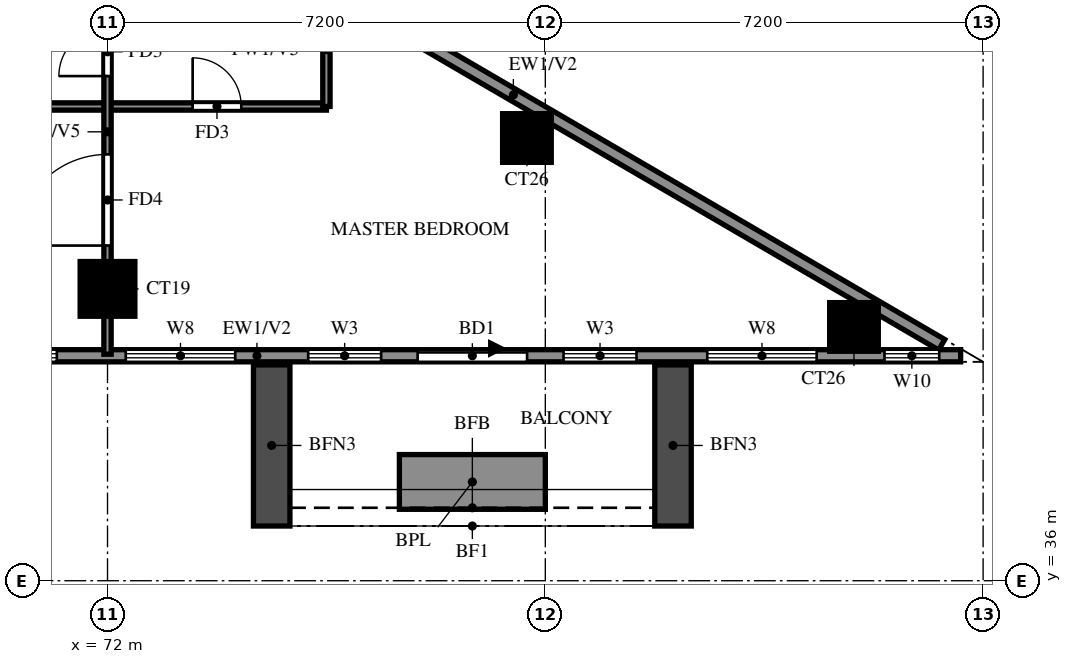
"""IFC4 building model, lengths in metres.
Left out: names, types, materials, properties, quantities, classifications, styles, units other than length and angle.
Written with IfcOpenShell. Run it as: python <this file> out.ifc"""

import sys

from ifc_helpers import new_model, si_unit, direction, frame, frame_2d, origin, origin_2d, place, context, subcontext, project, spatial, rectangle, extrude, source, transform, mapped, element, fill, save


model = new_model("IFC4")
c1 = context("Model", 3, precision=1e-05, world=origin(), true_north=direction((0.0, 1.0)))
c2 = subcontext(c1, "Body", "Model", "MODEL_VIEW")
j1 = project(units=[si_unit("LENGTHUNIT", "METRE"), si_unit("PLANEANGLEUNIT", "RADIAN")], contexts=[c1])
p1 = place(None, origin())
s1 = spatial("IfcSite", under=j1, at=p1, CompositionType="ELEMENT")
p2 = place(p1, origin())
s2 = spatial("IfcBuilding", under=s1, at=p2, CompositionType="ELEMENT")
p3 = place(p2, frame((0.0, 0.0, 195.5)))
s3 = spatial("IfcBuildingStorey", under=s2, at=p3, CompositionType="ELEMENT", Elevation=195.5)
m1 = source(origin(), c2, "Body", "SweptSolid", [
    extrude(rectangle(XDim=0.8, YDim=0.8, at=origin_2d()), origin(), (0.0, 0.0, 1.0), 3.2),
])
p4 = place(p3, frame((84.276, 40.174, 0.0), z_axis=(0.0, 0.0, 1.0), x_axis=(1.0, 0.0, 0.0)))
e1 = element("IfcColumn", 1, at=p4, inside=s3, PredefinedType="COLUMN", context=c2, shape_type="MappedRepresentation", body=[
    mapped(m1, transform((0.0, 0.0, 0.0))),
])
m2 = source(origin(), c2, "Body", "SweptSolid", [
    extrude(rectangle(XDim=0.9, YDim=0.9, at=origin_2d()), origin(), (0.0, 0.0, 1.0), 3.2),
])
p5 = place(p3, frame((72.0, 40.8, 0.0), z_axis=(0.0, 0.0, 1.0), x_axis=(1.0, 0.0, 0.0)))
e2 = element("IfcColumn", 2, at=p5, inside=s3, PredefinedType="COLUMN", context=c2, shape_type="MappedRepresentation", body=[
    mapped(m2, transform((0.0, 0.0, 0.0))),
])
p6 = place(p3, frame((78.898, 43.282, 0.0), z_axis=(0.0, 0.0, 1.0), x_axis=(1.0, 0.0, 0.0)))
e3 = element("IfcColumn", 3, at=p6, inside=s3, PredefinedType="COLUMN", context=c2, shape_type="MappedRepresentation", body=[
    mapped(m1, transform((0.0, 0.0, 0.0))),
])
p7 = place(p3, frame((85.719, 39.881, 0.0), z_axis=(0.0, 0.0, 1.0), x_axis=(-0.86377618652, 0.503875678716, 0.0)))
e4 = element("IfcWall", 4, at=p7, inside=s3, PredefinedType="SOLIDWALL", context=c2, shape_type="SweptSolid", body=[
    extrude(rectangle(XDim=16.311, YDim=0.2, at=frame_2d((8.156, 0.0))), origin(), (0.0, 0.0, 1.0), 3.2),
])
p8 = place(p7, frame((13.326, 0.0, 1.5)))
e5 = element("IfcOpeningElement", 5, at=p8, cuts=e4, PredefinedType="OPENING", context=c2, shape_type="SweptSolid", body=[
    extrude(rectangle(XDim=0.9, YDim=0.9, at=frame_2d((0.45, 0.45))), frame((0.0, 0.11, 0.0), z_axis=(0.0, -1.0, 0.0), x_axis=(1.0, 0.0, 0.0)), (0.0, 0.0, 1.0), 0.22),
])
p9 = place(p3, frame((58.8, 39.7, 0.0), z_axis=(0.0, 0.0, 1.0), x_axis=(1.0, 0.0, 0.0)))
e6 = element("IfcWall", 6, at=p9, inside=s3, PredefinedType="SOLIDWALL", context=c2, shape_type="SweptSolid", body=[
    extrude(rectangle(XDim=27.23, YDim=0.2, at=frame_2d((13.615, 0.0))), origin(), (0.0, 0.0, 1.0), 3.2),
])
p10 = place(p9, frame((18.3, 0.0, 0.0)))
e7 = element("IfcOpeningElement", 7, at=p10, cuts=e6, PredefinedType="OPENING", context=c2, shape_type="SweptSolid", body=[
    extrude(rectangle(XDim=1.8, YDim=2.4, at=frame_2d((0.9, 1.2))), frame((0.0, 0.11, 0.0), z_axis=(0.0, -1.0, 0.0), x_axis=(1.0, 0.0, 0.0)), (0.0, 0.0, 1.0), 0.22),
])
p11 = place(p9, frame((6.833, 0.0, 0.6)))
e8 = element("IfcOpeningElement", 8, at=p11, cuts=e6, PredefinedType="OPENING", context=c2, shape_type="SweptSolid", body=[
    extrude(rectangle(XDim=2.4, YDim=2.4, at=frame_2d((1.2, 1.2))), frame((0.0, 0.11, 0.0), z_axis=(0.0, -1.0, 0.0), x_axis=(1.0, 0.0, 0.0)), (0.0, 0.0, 1.0), 0.22),
])
p12 = place(p9, frame((9.967, 0.0, 0.6)))
e9 = element("IfcOpeningElement", 9, at=p12, cuts=e6, PredefinedType="OPENING", context=c2, shape_type="SweptSolid", body=[
    extrude(rectangle(XDim=2.4, YDim=2.4, at=frame_2d((1.2, 1.2))), frame((0.0, 0.11, 0.0), z_axis=(0.0, -1.0, 0.0), x_axis=(1.0, 0.0, 0.0)), (0.0, 0.0, 1.0), 0.22),
])
p13 = place(p9, frame((13.5, 0.0, 0.6)))
e10 = element("IfcOpeningElement", 10, at=p13, cuts=e6, PredefinedType="OPENING", context=c2, shape_type="SweptSolid", body=[
    extrude(rectangle(XDim=1.8, YDim=2.4, at=frame_2d((0.9, 1.2))), frame((0.0, 0.11, 0.0), z_axis=(0.0, -1.0, 0.0), x_axis=(1.0, 0.0, 0.0)), (0.0, 0.0, 1.0), 0.22),
])
p14 = place(p9, frame((16.5, 0.0, 0.6)))
e11 = element("IfcOpeningElement", 11, at=p14, cuts=e6, PredefinedType="OPENING", context=c2, shape_type="SweptSolid", body=[
    extrude(rectangle(XDim=1.2, YDim=2.4, at=frame_2d((0.6, 1.2))), frame((0.0, 0.11, 0.0), z_axis=(0.0, -1.0, 0.0), x_axis=(1.0, 0.0, 0.0)), (0.0, 0.0, 1.0), 0.22),
])
p15 = place(p9, frame((20.7, 0.0, 0.6)))
e12 = element("IfcOpeningElement", 12, at=p15, cuts=e6, PredefinedType="OPENING", context=c2, shape_type="SweptSolid", body=[
    extrude(rectangle(XDim=1.2, YDim=2.4, at=frame_2d((0.6, 1.2))), frame((0.0, 0.11, 0.0), z_axis=(0.0, -1.0, 0.0), x_axis=(1.0, 0.0, 0.0)), (0.0, 0.0, 1.0), 0.22),
])
p16 = place(p9, frame((23.063, 0.0, 0.6)))
e13 = element("IfcOpeningElement", 13, at=p16, cuts=e6, PredefinedType="OPENING", context=c2, shape_type="SweptSolid", body=[
    extrude(rectangle(XDim=1.8, YDim=2.4, at=frame_2d((0.9, 1.2))), frame((0.0, 0.11, 0.0), z_axis=(0.0, -1.0, 0.0), x_axis=(1.0, 0.0, 0.0)), (0.0, 0.0, 1.0), 0.22),
])
p17 = place(p9, frame((25.978, 0.0, 0.6)))
e14 = element("IfcOpeningElement", 14, at=p17, cuts=e6, PredefinedType="OPENING", context=c2, shape_type="SweptSolid", body=[
    extrude(rectangle(XDim=0.9, YDim=2.4, at=frame_2d((0.45, 1.2))), frame((0.0, 0.11, 0.0), z_axis=(0.0, -1.0, 0.0), x_axis=(1.0, 0.0, 0.0)), (0.0, 0.0, 1.0), 0.22),
])
for number, where, z_axis, x_axis in (
    (15, (74.7, 39.55, 0.0), (0.0, 0.0, 1.0), (0.0, -1.0, 0.0)),
    (16, (81.3, 39.55, 0.0), (0.0, 0.0, 1.0), (0.0, -1.0, 0.0)),
):
    element("IfcWall", number, at=place(p3, frame(where, z_axis=z_axis, x_axis=x_axis)), inside=s3, PredefinedType="SOLIDWALL", context=c2, shape_type="SweptSolid", body=[
        extrude(rectangle(XDim=2.65, YDim=0.6, at=frame_2d((1.325, 0.0))), origin(), (0.0, 0.0, 1.0), 2.85),
    ])
p18 = place(p3, frame((76.8, 37.625, 0.0), z_axis=(0.0, 0.0, 1.0), x_axis=(1.0, 0.0, 0.0)))
e17 = element("IfcWall", 17, at=p18, inside=s3, PredefinedType="SOLIDWALL", context=c2, shape_type="SweptSolid", body=[
    extrude(rectangle(XDim=2.4, YDim=0.9, at=frame_2d((1.2, 0.0))), origin(), (0.0, 0.0, 1.0), 0.9),
])
p19 = place(p3, frame((60.0, 43.8, 0.0), z_axis=(0.0, 0.0, 1.0), x_axis=(1.0, 0.0, 0.0)))
e18 = element("IfcWall", 18, at=p19, inside=s3, PredefinedType="PARTITIONING", context=c2, shape_type="SweptSolid", body=[
    extrude(rectangle(XDim=15.6, YDim=0.12, at=frame_2d((7.8, 0.0))), origin(), (0.0, 0.0, 1.0), 3.2),
])
p20 = place(p19, frame((7.65, 0.0, 0.0)))
e19 = element("IfcOpeningElement", 19, at=p20, cuts=e18, PredefinedType="OPENING", context=c2, shape_type="SweptSolid", body=[
    extrude(rectangle(XDim=1.5, YDim=2.1, at=frame_2d((0.75, 1.05))), frame((0.0, 0.07, 0.0), z_axis=(0.0, -1.0, 0.0), x_axis=(1.0, 0.0, 0.0)), (0.0, 0.0, 1.0), 0.14),
])
p21 = place(p19, frame((1.95, 0.0, 0.0)))
e20 = element("IfcOpeningElement", 20, at=p21, cuts=e18, PredefinedType="OPENING", context=c2, shape_type="SweptSolid", body=[
    extrude(rectangle(XDim=0.9, YDim=2.1, at=frame_2d((0.45, 1.05))), frame((0.0, 0.07, 0.0), z_axis=(0.0, -1.0, 0.0), x_axis=(1.0, 0.0, 0.0)), (0.0, 0.0, 1.0), 0.14),
])
p22 = place(p19, frame((13.4, 0.0, 0.0)))
e21 = element("IfcOpeningElement", 21, at=p22, cuts=e18, PredefinedType="OPENING", context=c2, shape_type="SweptSolid", body=[
    extrude(rectangle(XDim=0.8, YDim=2.1, at=frame_2d((0.4, 1.05))), frame((0.0, 0.07, 0.0), z_axis=(0.0, -1.0, 0.0), x_axis=(1.0, 0.0, 0.0)), (0.0, 0.0, 1.0), 0.14),
])
p23 = place(p3, frame((72.0, 39.725, 0.0), z_axis=(0.0, 0.0, 1.0), x_axis=(0.0, 1.0, 0.0)))
e22 = element("IfcWall", 22, at=p23, inside=s3, PredefinedType="PARTITIONING", context=c2, shape_type="SweptSolid", body=[
    extrude(rectangle(XDim=8.13, YDim=0.12, at=frame_2d((4.065, 0.0))), origin(), (0.0, 0.0, 1.0), 2.3),
])
p24 = place(p23, frame((1.788, 0.0, 0.0)))
e23 = element("IfcOpeningElement", 23, at=p24, cuts=e22, PredefinedType="OPENING", context=c2, shape_type="SweptSolid", body=[
    extrude(rectangle(XDim=1.5, YDim=2.1, at=frame_2d((0.75, 1.05))), frame((0.0, 0.07, 0.0), z_axis=(0.0, -1.0, 0.0), x_axis=(1.0, 0.0, 0.0)), (0.0, 0.0, 1.0), 0.14),
])
p25 = place(p23, frame((4.575, 0.0, 0.0)))
e24 = element("IfcOpeningElement", 24, at=p25, cuts=e22, PredefinedType="OPENING", context=c2, shape_type="SweptSolid", body=[
    extrude(rectangle(XDim=0.8, YDim=2.1, at=frame_2d((0.4, 1.05))), frame((0.0, 0.07, 0.0), z_axis=(0.0, -1.0, 0.0), x_axis=(1.0, 0.0, 0.0)), (0.0, 0.0, 1.0), 0.14),
])
p26 = place(p3, frame((75.6, 43.8, 0.0), z_axis=(0.0, 0.0, 1.0), x_axis=(0.0, 1.0, 0.0)))
e25 = element("IfcWall", 25, at=p26, inside=s3, PredefinedType="PARTITIONING", context=c2, shape_type="SweptSolid", body=[
    extrude(rectangle(XDim=1.868, YDim=0.12, at=frame_2d((0.934, 0.0))), origin(), (0.0, 0.0, 1.0), 2.3),
])
p27 = place(p10, origin())
e26 = element("IfcDoor", 26, at=p27, inside=s3, OperationType="DOUBLE_DOOR_SLIDING", PredefinedType="DOOR", context=c2, shape_type="SweptSolid", body=[
    extrude(rectangle(XDim=1.8, YDim=2.4, at=frame_2d((0.9, 1.2))), frame((0.0, 0.025, 0.0), z_axis=(0.0, -1.0, 0.0), x_axis=(1.0, 0.0, 0.0)), (0.0, 0.0, 1.0), 0.05),
])
fill(e7, e26)
p28 = place(p12, origin())
e27 = element("IfcWindow", 27, at=p28, inside=s3, PartitioningType="DOUBLE_PANEL_VERTICAL", PredefinedType="WINDOW", context=c2, shape_type="SweptSolid", body=[
    extrude(rectangle(XDim=2.4, YDim=2.4, at=frame_2d((1.2, 1.2))), frame((0.0, 0.03, 0.0), z_axis=(0.0, -1.0, 0.0), x_axis=(1.0, 0.0, 0.0)), (0.0, 0.0, 1.0), 0.06),
])
fill(e9, e27)
p29 = place(p13, origin())
e28 = element("IfcWindow", 28, at=p29, inside=s3, PartitioningType="DOUBLE_PANEL_VERTICAL", PredefinedType="WINDOW", context=c2, shape_type="SweptSolid", body=[
    extrude(rectangle(XDim=1.8, YDim=2.4, at=frame_2d((0.9, 1.2))), frame((0.0, 0.03, 0.0), z_axis=(0.0, -1.0, 0.0), x_axis=(1.0, 0.0, 0.0)), (0.0, 0.0, 1.0), 0.06),
])
fill(e10, e28)
p30 = place(p14, origin())
e29 = element("IfcWindow", 29, at=p30, inside=s3, PartitioningType="SINGLE_PANEL", PredefinedType="WINDOW", context=c2, shape_type="SweptSolid", body=[
    extrude(rectangle(XDim=1.2, YDim=2.4, at=frame_2d((0.6, 1.2))), frame((0.0, 0.03, 0.0), z_axis=(0.0, -1.0, 0.0), x_axis=(1.0, 0.0, 0.0)), (0.0, 0.0, 1.0), 0.06),
])
fill(e11, e29)
p31 = place(p15, origin())
e30 = element("IfcWindow", 30, at=p31, inside=s3, PartitioningType="SINGLE_PANEL", PredefinedType="WINDOW", context=c2, shape_type="SweptSolid", body=[
    extrude(rectangle(XDim=1.2, YDim=2.4, at=frame_2d((0.6, 1.2))), frame((0.0, 0.03, 0.0), z_axis=(0.0, -1.0, 0.0), x_axis=(1.0, 0.0, 0.0)), (0.0, 0.0, 1.0), 0.06),
])
fill(e12, e30)
p32 = place(p16, origin())
e31 = element("IfcWindow", 31, at=p32, inside=s3, PartitioningType="DOUBLE_PANEL_VERTICAL", PredefinedType="WINDOW", context=c2, shape_type="SweptSolid", body=[
    extrude(rectangle(XDim=1.8, YDim=2.4, at=frame_2d((0.9, 1.2))), frame((0.0, 0.03, 0.0), z_axis=(0.0, -1.0, 0.0), x_axis=(1.0, 0.0, 0.0)), (0.0, 0.0, 1.0), 0.06),
])
fill(e13, e31)
p33 = place(p17, origin())
e32 = element("IfcWindow", 32, at=p33, inside=s3, PartitioningType="SINGLE_PANEL", PredefinedType="WINDOW", context=c2, shape_type="SweptSolid", body=[
    extrude(rectangle(XDim=0.9, YDim=2.4, at=frame_2d((0.45, 1.2))), frame((0.0, 0.03, 0.0), z_axis=(0.0, -1.0, 0.0), x_axis=(1.0, 0.0, 0.0)), (0.0, 0.0, 1.0), 0.06),
])
fill(e14, e32)
p34 = place(p24, origin())
e33 = element("IfcDoor", 33, at=p34, inside=s3, OperationType="SINGLE_SWING_LEFT", PredefinedType="DOOR", context=c2, shape_type="SweptSolid", body=[
    extrude(rectangle(XDim=1.5, YDim=2.1, at=frame_2d((0.75, 1.05))), frame((0.0, 0.025, 0.0), z_axis=(0.0, -1.0, 0.0), x_axis=(1.0, 0.0, 0.0)), (0.0, 0.0, 1.0), 0.05),
])
fill(e23, e33)
p35 = place(p25, origin())
e34 = element("IfcDoor", 34, at=p35, inside=s3, OperationType="SINGLE_SWING_LEFT", PredefinedType="DOOR", context=c2, shape_type="SweptSolid", body=[
    extrude(rectangle(XDim=0.8, YDim=2.1, at=frame_2d((0.4, 1.05))), frame((0.0, 0.025, 0.0), z_axis=(0.0, -1.0, 0.0), x_axis=(1.0, 0.0, 0.0)), (0.0, 0.0, 1.0), 0.05),
])
fill(e24, e34)
p36 = place(p22, origin())
e35 = element("IfcDoor", 35, at=p36, inside=s3, OperationType="SINGLE_SWING_LEFT", PredefinedType="DOOR", context=c2, shape_type="SweptSolid", body=[
    extrude(rectangle(XDim=0.8, YDim=2.1, at=frame_2d((0.4, 1.05))), frame((0.0, 0.025, 0.0), z_axis=(0.0, -1.0, 0.0), x_axis=(1.0, 0.0, 0.0)), (0.0, 0.0, 1.0), 0.05),
])
fill(e21, e35)
save(model, sys.argv[1])
